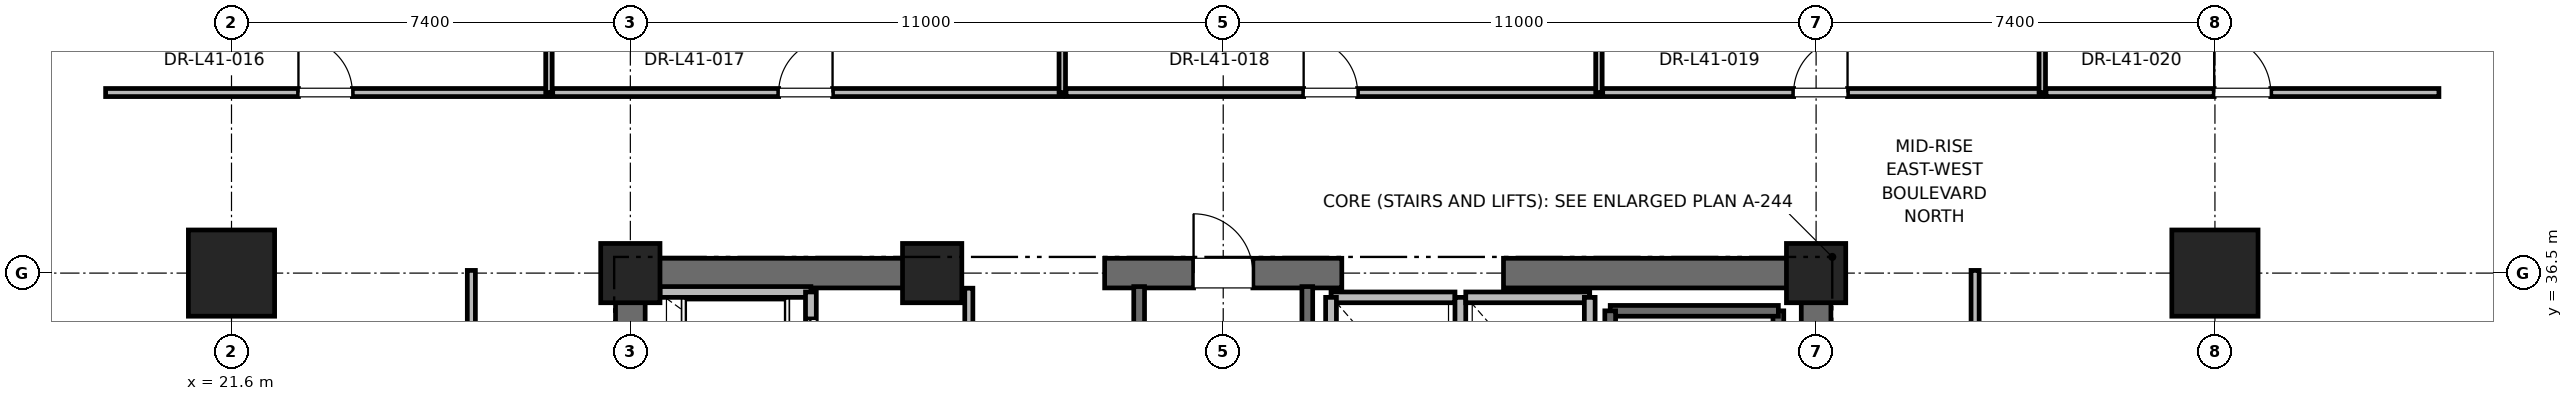
"""IFC4 building model, lengths in metres.
Left out: names, types, materials, properties, quantities, classifications, styles, units other than length and angle.
Written with IfcOpenShell. Run it as: python <this file> out.ifc"""

import sys

from ifc_helpers import new_model, si_unit, direction, frame, frame_2d, origin, origin_2d, place, context, subcontext, project, spatial, rectangle, extrude, element, fill, save


model = new_model("IFC4")
c1 = context("Model", 3, precision=1e-05, world=origin(), true_north=direction((0.0, 1.0)))
c2 = subcontext(c1, "Body", "Model", "MODEL_VIEW")
j1 = project(units=[si_unit("LENGTHUNIT", "METRE"), si_unit("PLANEANGLEUNIT", "RADIAN")], contexts=[c1])
p1 = place(None, origin())
s1 = spatial("IfcSite", under=j1, at=p1, CompositionType="ELEMENT")
p2 = place(p1, origin())
s2 = spatial("IfcBuilding", under=s1, at=p2, CompositionType="ELEMENT")
p3 = place(p2, frame((0.0, 0.0, 176.4)))
s3 = spatial("IfcBuildingStorey", under=s2, at=p3, CompositionType="ELEMENT", Elevation=176.4)
for number, where, z_axis, x_axis in (
    (1, (21.6, 36.5, 0.0), (0.0, 0.0, 1.0), (1.0, 0.0, 0.0)),
    (2, (58.4, 36.5, 0.0), (0.0, 0.0, 1.0), (1.0, 0.0, 0.0)),
):
    element("IfcColumn", number, at=place(p3, frame(where, z_axis=z_axis, x_axis=x_axis)), inside=s3, PredefinedType="COLUMN", context=c2, shape_type="SweptSolid", body=[
        extrude(rectangle(XDim=1.6, YDim=1.6, at=origin_2d()), origin(), (0.0, 0.0, 1.0), 4.0),
    ])
for number, where, z_axis, x_axis in (
    (3, (29.0, 36.5, 0.0), (0.0, 0.0, 1.0), (1.0, 0.0, 0.0)),
    (4, (51.0, 36.5, 0.0), (0.0, 0.0, 1.0), (1.0, 0.0, 0.0)),
    (5, (34.6, 36.5, 0.0), (0.0, 0.0, 1.0), (1.0, 0.0, 0.0)),
):
    element("IfcColumn", number, at=place(p3, frame(where, z_axis=z_axis, x_axis=x_axis)), inside=s3, PredefinedType="PILASTER", context=c2, shape_type="SweptSolid", body=[
        extrude(rectangle(XDim=1.1, YDim=1.1, at=origin_2d()), origin(), (0.0, 0.0, 1.0), 4.0),
    ])
p4 = place(p3, frame((29.0, 36.5, 0.0), z_axis=(0.0, 0.0, 1.0), x_axis=(1.0, 0.0, 0.0)))
e6 = element("IfcWall", 6, at=p4, inside=s3, PredefinedType="SHEAR", context=c2, shape_type="SweptSolid", body=[
    extrude(rectangle(XDim=5.8, YDim=0.55, at=frame_2d((2.9, 0.0))), origin(), (0.0, 0.0, 1.0), 3.775),
])
p5 = place(p3, frame((37.8, 36.5, 0.0), z_axis=(0.0, 0.0, 1.0), x_axis=(1.0, 0.0, 0.0)))
e7 = element("IfcWall", 7, at=p5, inside=s3, PredefinedType="SHEAR", context=c2, shape_type="SweptSolid", body=[
    extrude(rectangle(XDim=4.4, YDim=0.55, at=frame_2d((2.2, 0.0))), origin(), (0.0, 0.0, 1.0), 3.775),
])
p6 = place(p5, frame((1.65, 0.0, 0.0)))
e8 = element("IfcOpeningElement", 8, at=p6, cuts=e7, PredefinedType="OPENING", context=c2, shape_type="SweptSolid", body=[
    extrude(rectangle(XDim=1.1, YDim=2.15, at=frame_2d((0.55, 1.075))), frame((0.0, 0.275, 0.0), z_axis=(0.0, -1.0, 0.0), x_axis=(1.0, 0.0, 0.0)), (0.0, 0.0, 1.0), 0.55),
])
for number, where, z_axis, x_axis in (
    (9, (45.2, 36.5, 0.0), (0.0, 0.0, 1.0), (1.0, 0.0, 0.0)),
    (10, (29.0, 30.7, 0.0), (0.0, 0.0, 1.0), (0.0, 1.0, 0.0)),
):
    element("IfcWall", number, at=place(p3, frame(where, z_axis=z_axis, x_axis=x_axis)), inside=s3, PredefinedType="SHEAR", context=c2, shape_type="SweptSolid", body=[
        extrude(rectangle(XDim=5.8, YDim=0.55, at=frame_2d((2.9, 0.0))), origin(), (0.0, 0.0, 1.0), 3.775),
    ])
p7 = place(p3, frame((51.0, 27.7, 0.0), z_axis=(0.0, 0.0, 1.0), x_axis=(0.0, 1.0, 0.0)))
e11 = element("IfcWall", 11, at=p7, inside=s3, PredefinedType="SHEAR", context=c2, shape_type="SweptSolid", body=[
    extrude(rectangle(XDim=8.8, YDim=0.55, at=frame_2d((4.4, 0.0))), origin(), (0.0, 0.0, 1.0), 3.775),
])
p8 = place(p3, frame((50.3, 27.65, 0.0), z_axis=(0.0, 0.0, 1.0), x_axis=(0.0, 1.0, 0.0)))
e12 = element("IfcWall", 12, at=p8, inside=s3, PredefinedType="SOLIDWALL", context=c2, shape_type="SweptSolid", body=[
    extrude(rectangle(XDim=8.15, YDim=0.2, at=frame_2d((4.075, 0.0))), origin(), (0.0, 0.0, 1.0), 3.775),
])
p9 = place(p3, frame((47.18, 35.8, 0.0), z_axis=(0.0, 0.0, 1.0), x_axis=(1.0, 0.0, 0.0)))
e13 = element("IfcWall", 13, at=p9, inside=s3, PredefinedType="SOLIDWALL", context=c2, shape_type="SweptSolid", body=[
    extrude(rectangle(XDim=3.12, YDim=0.2, at=frame_2d((1.56, 0.0))), origin(), (0.0, 0.0, 1.0), 3.775),
])
p10 = place(p3, frame((47.18, 27.62, 0.0), z_axis=(0.0, 0.0, 1.0), x_axis=(0.0, 1.0, 0.0)))
e14 = element("IfcWall", 14, at=p10, inside=s3, PredefinedType="SOLIDWALL", context=c2, shape_type="SweptSolid", body=[
    extrude(rectangle(XDim=8.18, YDim=0.2, at=frame_2d((4.09, 0.0))), origin(), (0.0, 0.0, 1.0), 3.775),
])
p11 = place(p3, frame((38.44, 27.38, 0.0), z_axis=(0.0, 0.0, 1.0), x_axis=(0.0, 1.0, 0.0)))
e15 = element("IfcWall", 15, at=p11, inside=s3, PredefinedType="SOLIDWALL", context=c2, shape_type="SweptSolid", body=[
    extrude(rectangle(XDim=8.87, YDim=0.2, at=frame_2d((4.435, 0.0))), origin(), (0.0, 0.0, 1.0), 3.775),
])
p12 = place(p3, frame((41.56, 27.68, 0.0), z_axis=(0.0, 0.0, 1.0), x_axis=(0.0, 1.0, 0.0)))
e16 = element("IfcWall", 16, at=p12, inside=s3, PredefinedType="SOLIDWALL", context=c2, shape_type="SweptSolid", body=[
    extrude(rectangle(XDim=8.57, YDim=0.2, at=frame_2d((4.285, 0.0))), origin(), (0.0, 0.0, 1.0), 3.775),
])
p13 = place(p3, frame((32.35, 36.15, 0.0), z_axis=(0.0, 0.0, 1.0), x_axis=(-1.0, 0.0, 0.0)))
e17 = element("IfcWall", 17, at=p13, inside=s3, PredefinedType="SOLIDWALL", context=c2, shape_type="SweptSolid", body=[
    extrude(rectangle(XDim=2.8, YDim=0.2, at=frame_2d((1.4, 0.0))), origin(), (0.0, 0.0, 1.0), 2.985),
])
p14 = place(p3, frame((32.35, 34.05, 0.0), z_axis=(0.0, 0.0, 1.0), x_axis=(0.0, 1.0, 0.0)))
e18 = element("IfcWall", 18, at=p14, inside=s3, PredefinedType="SOLIDWALL", context=c2, shape_type="SweptSolid", body=[
    extrude(rectangle(XDim=2.1, YDim=0.2, at=frame_2d((1.05, 0.0))), origin(), (0.0, 0.0, 1.0), 3.775),
])
p15 = place(p14, frame((0.5, 0.0, 0.0)))
e19 = element("IfcOpeningElement", 19, at=p15, cuts=e18, PredefinedType="OPENING", context=c2, shape_type="SweptSolid", body=[
    extrude(rectangle(XDim=1.1, YDim=2.2, at=frame_2d((0.55, 1.1))), frame((0.0, 0.1, 0.0), z_axis=(0.0, -1.0, 0.0), x_axis=(1.0, 0.0, 0.0)), (0.0, 0.0, 1.0), 0.2),
])
p16 = place(p3, frame((44.3, 36.05, 0.0), z_axis=(0.0, 0.0, 1.0), x_axis=(-1.0, 0.0, 0.0)))
e20 = element("IfcWall", 20, at=p16, inside=s3, PredefinedType="SOLIDWALL", context=c2, shape_type="SweptSolid", body=[
    extrude(rectangle(XDim=2.3, YDim=0.2, at=frame_2d((1.15, 0.0))), origin(), (0.0, 0.0, 1.0), 2.755),
])
for number, where, z_axis, x_axis in (
    (21, (42.0, 36.05, 0.0), (0.0, 0.0, 1.0), (0.0, -1.0, 0.0)),
    (22, (44.4, 33.45, 0.0), (0.0, 0.0, 1.0), (0.0, 1.0, 0.0)),
):
    element("IfcWall", number, at=place(p3, frame(where, z_axis=z_axis, x_axis=x_axis)), inside=s3, PredefinedType="SOLIDWALL", context=c2, shape_type="SweptSolid", body=[
        extrude(rectangle(XDim=2.6, YDim=0.2, at=frame_2d((1.3, 0.0))), origin(), (0.0, 0.0, 1.0), 2.755),
    ])
p17 = place(p3, frame((46.8, 36.05, 0.0), z_axis=(0.0, 0.0, 1.0), x_axis=(-1.0, 0.0, 0.0)))
e23 = element("IfcWall", 23, at=p17, inside=s3, PredefinedType="SOLIDWALL", context=c2, shape_type="SweptSolid", body=[
    extrude(rectangle(XDim=2.3, YDim=0.2, at=frame_2d((1.15, 0.0))), origin(), (0.0, 0.0, 1.0), 2.755),
])
p18 = place(p3, frame((46.8, 33.45, 0.0), z_axis=(0.0, 0.0, 1.0), x_axis=(0.0, 1.0, 0.0)))
e24 = element("IfcWall", 24, at=p18, inside=s3, PredefinedType="SOLIDWALL", context=c2, shape_type="SweptSolid", body=[
    extrude(rectangle(XDim=2.6, YDim=0.2, at=frame_2d((1.3, 0.0))), origin(), (0.0, 0.0, 1.0), 3.775),
])
p19 = place(p3, frame((35.28, 33.95, 0.0), z_axis=(0.0, 0.0, 1.0), x_axis=(0.0, 1.0, 0.0)))
e25 = element("IfcWall", 25, at=p19, inside=s3, PredefinedType="PARTITIONING", context=c2, shape_type="SweptSolid", body=[
    extrude(rectangle(XDim=2.27, YDim=0.15, at=frame_2d((1.135, 0.0))), origin(), (0.0, 0.0, 1.0), 2.755),
])
p20 = place(p19, frame((0.66, 0.0, 0.0)))
e26 = element("IfcOpeningElement", 26, at=p20, cuts=e25, PredefinedType="OPENING", context=c2, shape_type="SweptSolid", body=[
    extrude(rectangle(XDim=0.95, YDim=2.15, at=frame_2d((0.475, 1.075))), frame((0.0, 0.075, 0.0), z_axis=(0.0, -1.0, 0.0), x_axis=(1.0, 0.0, 0.0)), (0.0, 0.0, 1.0), 0.15),
])
p21 = place(p3, frame((19.264, 39.85, 0.0), z_axis=(0.0, 0.0, 1.0), x_axis=(1.0, 0.0, 0.0)))
e27 = element("IfcWall", 27, at=p21, inside=s3, PredefinedType="PARTITIONING", context=c2, shape_type="SweptSolid", body=[
    extrude(rectangle(XDim=8.225, YDim=0.15, at=frame_2d((4.113, 0.0))), origin(), (0.0, 0.0, 1.0), 2.85),
])
p22 = place(p21, frame((3.578, 0.0, 0.0)))
e28 = element("IfcOpeningElement", 28, at=p22, cuts=e27, PredefinedType="OPENING", context=c2, shape_type="SweptSolid", body=[
    extrude(rectangle(XDim=1.0, YDim=2.15, at=frame_2d((0.5, 1.075))), frame((0.0, 0.075, 0.0), z_axis=(0.0, -1.0, 0.0), x_axis=(1.0, 0.0, 0.0)), (0.0, 0.0, 1.0), 0.15),
])
p23 = place(p3, frame((27.49, 39.85, 0.0), z_axis=(0.0, 0.0, 1.0), x_axis=(0.0, 1.0, 0.0)))
e29 = element("IfcWall", 29, at=p23, inside=s3, PredefinedType="PARTITIONING", context=c2, shape_type="SweptSolid", body=[
    extrude(rectangle(XDim=9.245, YDim=0.12, at=frame_2d((4.623, 0.0))), origin(), (0.0, 0.0, 1.0), 2.85),
])
p24 = place(p3, frame((27.56, 39.85, 0.0), z_axis=(0.0, 0.0, 1.0), x_axis=(1.0, 0.0, 0.0)))
e30 = element("IfcWall", 30, at=p24, inside=s3, PredefinedType="PARTITIONING", context=c2, shape_type="SweptSolid", body=[
    extrude(rectangle(XDim=9.454, YDim=0.15, at=frame_2d((4.727, 0.0))), origin(), (0.0, 0.0, 1.0), 2.85),
])
p25 = place(p24, frame((4.192, 0.0, 0.0)))
e31 = element("IfcOpeningElement", 31, at=p25, cuts=e30, PredefinedType="OPENING", context=c2, shape_type="SweptSolid", body=[
    extrude(rectangle(XDim=1.0, YDim=2.15, at=frame_2d((0.5, 1.075))), frame((0.0, 0.075, 0.0), z_axis=(0.0, -1.0, 0.0), x_axis=(1.0, 0.0, 0.0)), (0.0, 0.0, 1.0), 0.15),
])
p26 = place(p3, frame((37.014, 39.85, 0.0), z_axis=(0.0, 0.0, 1.0), x_axis=(0.0, 1.0, 0.0)))
e32 = element("IfcWall", 32, at=p26, inside=s3, PredefinedType="PARTITIONING", context=c2, shape_type="SweptSolid", body=[
    extrude(rectangle(XDim=9.245, YDim=0.12, at=frame_2d((4.623, 0.0))), origin(), (0.0, 0.0, 1.0), 2.405),
])
p27 = place(p3, frame((37.084, 39.85, 0.0), z_axis=(0.0, 0.0, 1.0), x_axis=(1.0, 0.0, 0.0)))
e33 = element("IfcWall", 33, at=p27, inside=s3, PredefinedType="PARTITIONING", context=c2, shape_type="SweptSolid", body=[
    extrude(rectangle(XDim=9.887, YDim=0.15, at=frame_2d((4.943, 0.0))), origin(), (0.0, 0.0, 1.0), 2.85),
])
p28 = place(p27, frame((4.408, 0.0, 0.0)))
e34 = element("IfcOpeningElement", 34, at=p28, cuts=e33, PredefinedType="OPENING", context=c2, shape_type="SweptSolid", body=[
    extrude(rectangle(XDim=1.0, YDim=2.15, at=frame_2d((0.5, 1.075))), frame((0.0, 0.075, 0.0), z_axis=(0.0, -1.0, 0.0), x_axis=(1.0, 0.0, 0.0)), (0.0, 0.0, 1.0), 0.15),
])
p29 = place(p3, frame((46.971, 39.85, 0.0), z_axis=(0.0, 0.0, 1.0), x_axis=(0.0, 1.0, 0.0)))
e35 = element("IfcWall", 35, at=p29, inside=s3, PredefinedType="PARTITIONING", context=c2, shape_type="SweptSolid", body=[
    extrude(rectangle(XDim=9.245, YDim=0.12, at=frame_2d((4.623, 0.0))), origin(), (0.0, 0.0, 1.0), 2.405),
])
p30 = place(p3, frame((47.041, 39.85, 0.0), z_axis=(0.0, 0.0, 1.0), x_axis=(1.0, 0.0, 0.0)))
e36 = element("IfcWall", 36, at=p30, inside=s3, PredefinedType="PARTITIONING", context=c2, shape_type="SweptSolid", body=[
    extrude(rectangle(XDim=8.156, YDim=0.15, at=frame_2d((4.078, 0.0))), origin(), (0.0, 0.0, 1.0), 2.85),
])
p31 = place(p30, frame((3.543, 0.0, 0.0)))
e37 = element("IfcOpeningElement", 37, at=p31, cuts=e36, PredefinedType="OPENING", context=c2, shape_type="SweptSolid", body=[
    extrude(rectangle(XDim=1.0, YDim=2.15, at=frame_2d((0.5, 1.075))), frame((0.0, 0.075, 0.0), z_axis=(0.0, -1.0, 0.0), x_axis=(1.0, 0.0, 0.0)), (0.0, 0.0, 1.0), 0.15),
])
p32 = place(p3, frame((55.196, 39.85, 0.0), z_axis=(0.0, 0.0, 1.0), x_axis=(0.0, 1.0, 0.0)))
e38 = element("IfcWall", 38, at=p32, inside=s3, PredefinedType="PARTITIONING", context=c2, shape_type="SweptSolid", body=[
    extrude(rectangle(XDim=9.245, YDim=0.12, at=frame_2d((4.623, 0.0))), origin(), (0.0, 0.0, 1.0), 2.85),
])
p33 = place(p3, frame((55.266, 39.85, 0.0), z_axis=(0.0, 0.0, 1.0), x_axis=(1.0, 0.0, 0.0)))
e39 = element("IfcWall", 39, at=p33, inside=s3, PredefinedType="PARTITIONING", context=c2, shape_type="SweptSolid", body=[
    extrude(rectangle(XDim=7.29, YDim=0.15, at=frame_2d((3.645, 0.0))), origin(), (0.0, 0.0, 1.0), 2.85),
])
p34 = place(p33, frame((3.12, 0.0, 0.0)))
e40 = element("IfcOpeningElement", 40, at=p34, cuts=e39, PredefinedType="OPENING", context=c2, shape_type="SweptSolid", body=[
    extrude(rectangle(XDim=1.05, YDim=2.2, at=frame_2d((0.525, 1.1))), frame((0.0, 0.075, 0.0), z_axis=(0.0, -1.0, 0.0), x_axis=(1.0, 0.0, 0.0)), (0.0, 0.0, 1.0), 0.15),
])
p35 = place(p3, frame((26.05, 18.45, 0.0), z_axis=(0.0, 0.0, 1.0), x_axis=(0.0, 1.0, 0.0)))
e41 = element("IfcWall", 41, at=p35, inside=s3, PredefinedType="PARTITIONING", context=c2, shape_type="SweptSolid", body=[
    extrude(rectangle(XDim=18.1, YDim=0.15, at=frame_2d((9.05, 0.0))), origin(), (0.0, 0.0, 1.0), 2.85),
])
p36 = place(p35, frame((8.55, 0.0, 0.0)))
e42 = element("IfcOpeningElement", 42, at=p36, cuts=e41, PredefinedType="OPENING", context=c2, shape_type="SweptSolid", body=[
    extrude(rectangle(XDim=1.0, YDim=2.15, at=frame_2d((0.5, 1.075))), frame((0.0, 0.075, 0.0), z_axis=(0.0, -1.0, 0.0), x_axis=(1.0, 0.0, 0.0)), (0.0, 0.0, 1.0), 0.15),
])
p37 = place(p3, frame((53.95, 26.122, 0.0), z_axis=(0.0, 0.0, 1.0), x_axis=(0.0, 1.0, 0.0)))
e43 = element("IfcWall", 43, at=p37, inside=s3, PredefinedType="PARTITIONING", context=c2, shape_type="SweptSolid", body=[
    extrude(rectangle(XDim=10.428, YDim=0.15, at=frame_2d((5.214, 0.0))), origin(), (0.0, 0.0, 1.0), 2.85),
])
p38 = place(p37, frame((4.639, 0.0, 0.0)))
e44 = element("IfcOpeningElement", 44, at=p38, cuts=e43, PredefinedType="OPENING", context=c2, shape_type="SweptSolid", body=[
    extrude(rectangle(XDim=1.0, YDim=2.15, at=frame_2d((0.5, 1.075))), frame((0.0, 0.075, 0.0), z_axis=(0.0, -1.0, 0.0), x_axis=(1.0, 0.0, 0.0)), (0.0, 0.0, 1.0), 0.15),
])
p39 = place(p6, origin())
e45 = element("IfcDoor", 45, at=p39, inside=s3, OperationType="SINGLE_SWING_LEFT", PredefinedType="DOOR", context=c2, shape_type="SweptSolid", body=[
    extrude(rectangle(XDim=1.1, YDim=2.15, at=frame_2d((0.55, 1.075))), frame((0.0, 0.025, 0.0), z_axis=(0.0, -1.0, 0.0), x_axis=(1.0, 0.0, 0.0)), (0.0, 0.0, 1.0), 0.05),
])
fill(e8, e45)
p40 = place(p15, origin())
e46 = element("IfcDoor", 46, at=p40, inside=s3, OperationType="SLIDING_TO_RIGHT", PredefinedType="DOOR", context=c2, shape_type="SweptSolid", body=[
    extrude(rectangle(XDim=1.1, YDim=2.2, at=frame_2d((0.55, 1.1))), frame((0.0, 0.025, 0.0), z_axis=(0.0, -1.0, 0.0), x_axis=(1.0, 0.0, 0.0)), (0.0, 0.0, 1.0), 0.05),
])
fill(e19, e46)
p41 = place(p22, origin())
e47 = element("IfcDoor", 47, at=p41, inside=s3, OperationType="SINGLE_SWING_LEFT", PredefinedType="DOOR", context=c2, shape_type="SweptSolid", body=[
    extrude(rectangle(XDim=1.0, YDim=2.15, at=frame_2d((0.5, 1.075))), frame((0.0, 0.025, 0.0), z_axis=(0.0, -1.0, 0.0), x_axis=(1.0, 0.0, 0.0)), (0.0, 0.0, 1.0), 0.05),
])
fill(e28, e47)
p42 = place(p25, origin())
e48 = element("IfcDoor", 48, at=p42, inside=s3, OperationType="SINGLE_SWING_RIGHT", PredefinedType="DOOR", context=c2, shape_type="SweptSolid", body=[
    extrude(rectangle(XDim=1.0, YDim=2.15, at=frame_2d((0.5, 1.075))), frame((0.0, 0.025, 0.0), z_axis=(0.0, -1.0, 0.0), x_axis=(1.0, 0.0, 0.0)), (0.0, 0.0, 1.0), 0.05),
])
fill(e31, e48)
p43 = place(p28, origin())
e49 = element("IfcDoor", 49, at=p43, inside=s3, OperationType="SINGLE_SWING_LEFT", PredefinedType="DOOR", context=c2, shape_type="SweptSolid", body=[
    extrude(rectangle(XDim=1.0, YDim=2.15, at=frame_2d((0.5, 1.075))), frame((0.0, 0.025, 0.0), z_axis=(0.0, -1.0, 0.0), x_axis=(1.0, 0.0, 0.0)), (0.0, 0.0, 1.0), 0.05),
])
fill(e34, e49)
p44 = place(p31, origin())
e50 = element("IfcDoor", 50, at=p44, inside=s3, OperationType="SINGLE_SWING_RIGHT", PredefinedType="DOOR", context=c2, shape_type="SweptSolid", body=[
    extrude(rectangle(XDim=1.0, YDim=2.15, at=frame_2d((0.5, 1.075))), frame((0.0, 0.025, 0.0), z_axis=(0.0, -1.0, 0.0), x_axis=(1.0, 0.0, 0.0)), (0.0, 0.0, 1.0), 0.05),
])
fill(e37, e50)
p45 = place(p34, origin())
e51 = element("IfcDoor", 51, at=p45, inside=s3, OperationType="SINGLE_SWING_LEFT", PredefinedType="DOOR", context=c2, shape_type="SweptSolid", body=[
    extrude(rectangle(XDim=1.05, YDim=2.2, at=frame_2d((0.525, 1.1))), frame((0.0, 0.025, 0.0), z_axis=(0.0, -1.0, 0.0), x_axis=(1.0, 0.0, 0.0)), (0.0, 0.0, 1.0), 0.05),
])
fill(e40, e51)
save(model, sys.argv[1])
